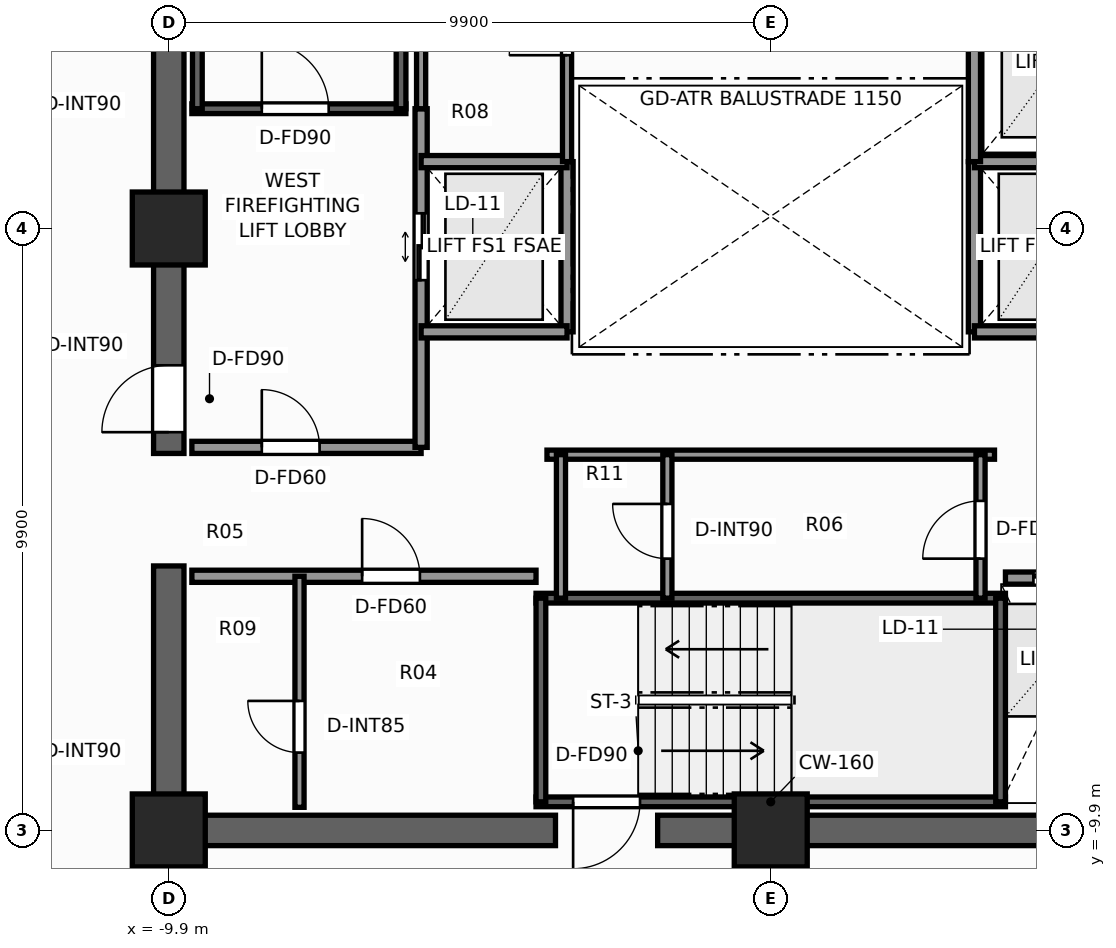
"""IFC4 building model, lengths in metres.
Left out: names, types, materials, properties, quantities, classifications, styles, units other than length and angle.
Written with IfcOpenShell. Run it as: python <this file> out.ifc"""

import sys

from ifc_helpers import new_model, si_unit, direction, frame, frame_2d, origin, origin_2d, place, context, subcontext, project, spatial, rectangle, extrude, element, fill, save


model = new_model("IFC4")
c1 = context("Model", 3, precision=1e-05, world=origin(), true_north=direction((0.0, 1.0)))
c2 = subcontext(c1, "Body", "Model", "MODEL_VIEW")
j1 = project(units=[si_unit("LENGTHUNIT", "METRE"), si_unit("PLANEANGLEUNIT", "RADIAN")], contexts=[c1])
p1 = place(None, origin())
s1 = spatial("IfcSite", under=j1, at=p1, CompositionType="ELEMENT")
p2 = place(p1, origin())
s2 = spatial("IfcBuilding", under=s1, at=p2, CompositionType="ELEMENT")
p3 = place(p2, frame((0.0, 0.0, 186.6)))
s3 = spatial("IfcBuildingStorey", under=s2, at=p3, CompositionType="ELEMENT", Elevation=186.6)
p4 = place(p3, frame((10.15, -9.9, 0.0), z_axis=(0.0, 0.0, 1.0), x_axis=(-1.0, 0.0, 0.0)))
e1 = element("IfcWall", 1, at=p4, inside=s3, PredefinedType="SHEAR", context=c2, shape_type="SweptSolid", body=[
    extrude(rectangle(XDim=12.01, YDim=0.5, at=frame_2d((6.005, 0.0))), origin(), (0.0, 0.0, 1.0), 3.3),
])
p5 = place(p3, frame((-3.54, -9.9, 0.0), z_axis=(0.0, 0.0, 1.0), x_axis=(-1.0, 0.0, 0.0)))
e2 = element("IfcWall", 2, at=p5, inside=s3, PredefinedType="SHEAR", context=c2, shape_type="SweptSolid", body=[
    extrude(rectangle(XDim=6.61, YDim=0.5, at=frame_2d((3.305, 0.0))), origin(), (0.0, 0.0, 1.0), 3.3),
])
p6 = place(p3, frame((-9.9, -9.65, 0.0), z_axis=(0.0, 0.0, 1.0), x_axis=(0.0, 1.0, 0.0)))
e3 = element("IfcWall", 3, at=p6, inside=s3, PredefinedType="SHEAR", context=c2, shape_type="SweptSolid", body=[
    extrude(rectangle(XDim=4.1, YDim=0.5, at=frame_2d((2.05, 0.0))), origin(), (0.0, 0.0, 1.0), 3.3),
])
p7 = place(p3, frame((-9.9, -3.7, 0.0), z_axis=(0.0, 0.0, 1.0), x_axis=(0.0, 1.0, 0.0)))
e4 = element("IfcWall", 4, at=p7, inside=s3, PredefinedType="SHEAR", context=c2, shape_type="SweptSolid", body=[
    extrude(rectangle(XDim=13.35, YDim=0.5, at=frame_2d((6.675, 0.0))), origin(), (0.0, 0.0, 1.0), 3.3),
])
p8 = place(p7, frame((0.35, 0.0, 0.0)))
e5 = element("IfcOpeningElement", 5, at=p8, cuts=e4, PredefinedType="OPENING", context=c2, shape_type="SweptSolid", body=[
    extrude(rectangle(XDim=1.1, YDim=2.2, at=frame_2d((0.55, 1.1))), frame((0.0, 0.26, 0.0), z_axis=(0.0, -1.0, 0.0), x_axis=(1.0, 0.0, 0.0)), (0.0, 0.0, 1.0), 0.52),
])
for number, where, z_axis, x_axis in (
    (6, (-9.9, -9.9, 0.0), (0.0, 0.0, 1.0), (1.0, 0.0, 0.0)),
    (7, (0.0, -9.9, 0.0), (0.0, 0.0, 1.0), (1.0, 0.0, 0.0)),
    (8, (-9.9, 0.0, 0.0), (0.0, 0.0, 1.0), (1.0, 0.0, 0.0)),
):
    element("IfcColumn", number, at=place(p3, frame(where, z_axis=z_axis, x_axis=x_axis)), inside=s3, PredefinedType="COLUMN", context=c2, shape_type="SweptSolid", body=[
        extrude(rectangle(XDim=1.2, YDim=1.2, at=origin_2d()), origin(), (0.0, 0.0, 1.0), 3.3),
    ])
p9 = place(p3, frame((-9.52, 1.97, 0.0), z_axis=(0.0, 0.0, 1.0), x_axis=(1.0, 0.0, 0.0)))
e9 = element("IfcWall", 9, at=p9, inside=s3, PredefinedType="SHEAR", context=c2, shape_type="SweptSolid", body=[
    extrude(rectangle(XDim=3.52, YDim=0.16, at=frame_2d((1.76, 0.0))), origin(), (0.0, 0.0, 1.0), 3.3),
])
p10 = place(p9, frame((1.15, 0.0, 0.0)))
e10 = element("IfcOpeningElement", 10, at=p10, cuts=e9, PredefinedType="OPENING", context=c2, shape_type="SweptSolid", body=[
    extrude(rectangle(XDim=1.1, YDim=2.2, at=frame_2d((0.55, 1.1))), frame((0.0, 0.09, 0.0), z_axis=(0.0, -1.0, 0.0), x_axis=(1.0, 0.0, 0.0)), (0.0, 0.0, 1.0), 0.18),
])
for number, where, z_axis, x_axis in (
    (11, (-9.43, 1.97, 0.0), (0.0, 0.0, 1.0), (0.0, 1.0, 0.0)),
    (12, (-6.08, 1.97, 0.0), (0.0, 0.0, 1.0), (0.0, 1.0, 0.0)),
):
    element("IfcWall", number, at=place(p3, frame(where, z_axis=z_axis, x_axis=x_axis)), inside=s3, PredefinedType="SHEAR", context=c2, shape_type="SweptSolid", body=[
        extrude(rectangle(XDim=7.56, YDim=0.16, at=frame_2d((3.78, 0.0))), origin(), (0.0, 0.0, 1.0), 3.3),
    ])
p11 = place(p3, frame((3.86, -9.43, 0.0), z_axis=(0.0, 0.0, 1.0), x_axis=(-1.0, 0.0, 0.0)))
e13 = element("IfcWall", 13, at=p11, inside=s3, PredefinedType="SHEAR", context=c2, shape_type="SweptSolid", body=[
    extrude(rectangle(XDim=7.72, YDim=0.16, at=frame_2d((3.86, 0.0))), origin(), (0.0, 0.0, 1.0), 3.3),
])
p12 = place(p11, frame((6.01, 0.0, 0.0)))
e14 = element("IfcOpeningElement", 14, at=p12, cuts=e13, PredefinedType="OPENING", context=c2, shape_type="SweptSolid", body=[
    extrude(rectangle(XDim=1.1, YDim=2.2, at=frame_2d((0.55, 1.1))), frame((0.0, 0.09, 0.0), z_axis=(0.0, -1.0, 0.0), x_axis=(1.0, 0.0, 0.0)), (0.0, 0.0, 1.0), 0.18),
])
p13 = place(p3, frame((-3.86, -6.08, 0.0), z_axis=(0.0, 0.0, 1.0), x_axis=(1.0, 0.0, 0.0)))
e15 = element("IfcWall", 15, at=p13, inside=s3, PredefinedType="SHEAR", context=c2, shape_type="SweptSolid", body=[
    extrude(rectangle(XDim=7.72, YDim=0.16, at=frame_2d((3.86, 0.0))), origin(), (0.0, 0.0, 1.0), 3.3),
])
for number, where, z_axis, x_axis in (
    (16, (-3.78, -9.43, 0.0), (0.0, 0.0, 1.0), (0.0, 1.0, 0.0)),
    (17, (3.78, -9.43, 0.0), (0.0, 0.0, 1.0), (0.0, 1.0, 0.0)),
):
    element("IfcWall", number, at=place(p3, frame(where, z_axis=z_axis, x_axis=x_axis)), inside=s3, PredefinedType="SHEAR", context=c2, shape_type="SweptSolid", body=[
        extrude(rectangle(XDim=3.35, YDim=0.16, at=frame_2d((1.675, 0.0))), origin(), (0.0, 0.0, 1.0), 3.3),
    ])
p14 = place(p3, frame((-9.52, -3.6, 0.0), z_axis=(0.0, 0.0, 1.0), x_axis=(1.0, 0.0, 0.0)))
e18 = element("IfcWall", 18, at=p14, inside=s3, PredefinedType="SOLIDWALL", context=c2, shape_type="SweptSolid", body=[
    extrude(rectangle(XDim=3.77, YDim=0.2, at=frame_2d((1.885, 0.0))), origin(), (0.0, 0.0, 1.0), 3.08),
])
p15 = place(p14, frame((1.15, 0.0, 0.0)))
e19 = element("IfcOpeningElement", 19, at=p15, cuts=e18, PredefinedType="OPENING", context=c2, shape_type="SweptSolid", body=[
    extrude(rectangle(XDim=0.95, YDim=2.06, at=frame_2d((0.475, 1.03))), frame((0.0, 0.11, 0.0), z_axis=(0.0, -1.0, 0.0), x_axis=(1.0, 0.0, 0.0)), (0.0, 0.0, 1.0), 0.22),
])
p16 = place(p3, frame((-5.75, -3.6, 0.0), z_axis=(0.0, 0.0, 1.0), x_axis=(0.0, 1.0, 0.0)))
e20 = element("IfcWall", 20, at=p16, inside=s3, PredefinedType="SOLIDWALL", context=c2, shape_type="SweptSolid", body=[
    extrude(rectangle(XDim=5.57, YDim=0.2, at=frame_2d((2.785, 0.0))), origin(), (0.0, 0.0, 1.0), 2.715),
])
p17 = place(p16, frame((2.75, 0.0, 0.0)))
e21 = element("IfcOpeningElement", 21, at=p17, cuts=e20, PredefinedType="OPENING", context=c2, shape_type="SweptSolid", body=[
    extrude(rectangle(XDim=1.1, YDim=2.2, at=frame_2d((0.55, 1.1))), frame((0.0, 0.11, 0.0), z_axis=(0.0, -1.0, 0.0), x_axis=(1.0, 0.0, 0.0)), (0.0, 0.0, 1.0), 0.22),
])
p18 = place(p3, frame((-3.35, -1.7, 0.0), z_axis=(0.0, 0.0, 1.0), x_axis=(0.0, 1.0, 0.0)))
e22 = element("IfcWall", 22, at=p18, inside=s3, PredefinedType="SOLIDWALL", context=c2, shape_type="SweptSolid", body=[
    extrude(rectangle(XDim=2.8, YDim=0.2, at=frame_2d((1.4, 0.0))), origin(), (0.0, 0.0, 1.0), 2.715),
])
for number, where, z_axis, x_axis in (
    (23, (-5.75, -1.7, 0.0), (0.0, 0.0, 1.0), (1.0, 0.0, 0.0)),
    (24, (-5.75, 1.1, 0.0), (0.0, 0.0, 1.0), (1.0, 0.0, 0.0)),
):
    element("IfcWall", number, at=place(p3, frame(where, z_axis=z_axis, x_axis=x_axis)), inside=s3, PredefinedType="SOLIDWALL", context=c2, shape_type="SweptSolid", body=[
        extrude(rectangle(XDim=2.4, YDim=0.2, at=frame_2d((1.2, 0.0))), origin(), (0.0, 0.0, 1.0), 3.08),
    ])
p19 = place(p3, frame((3.35, -1.7, 0.0), z_axis=(0.0, 0.0, 1.0), x_axis=(0.0, 1.0, 0.0)))
e25 = element("IfcWall", 25, at=p19, inside=s3, PredefinedType="SOLIDWALL", context=c2, shape_type="SweptSolid", body=[
    extrude(rectangle(XDim=2.8, YDim=0.2, at=frame_2d((1.4, 0.0))), origin(), (0.0, 0.0, 1.0), 2.715),
])
for number, where, z_axis, x_axis in (
    (26, (3.35, -1.7, 0.0), (0.0, 0.0, 1.0), (1.0, 0.0, 0.0)),
    (27, (3.35, 1.1, 0.0), (0.0, 0.0, 1.0), (1.0, 0.0, 0.0)),
):
    element("IfcWall", number, at=place(p3, frame(where, z_axis=z_axis, x_axis=x_axis)), inside=s3, PredefinedType="SOLIDWALL", context=c2, shape_type="SweptSolid", body=[
        extrude(rectangle(XDim=2.4, YDim=0.2, at=frame_2d((1.2, 0.0))), origin(), (0.0, 0.0, 1.0), 3.08),
    ])
p20 = place(p3, frame((3.35, 1.1, 0.0), z_axis=(0.0, 0.0, 1.0), x_axis=(0.0, 1.0, 0.0)))
e28 = element("IfcWall", 28, at=p20, inside=s3, PredefinedType="SOLIDWALL", context=c2, shape_type="SweptSolid", body=[
    extrude(rectangle(XDim=3.2, YDim=0.2, at=frame_2d((1.6, 0.0))), origin(), (0.0, 0.0, 1.0), 2.715),
])
p21 = place(p3, frame((-9.52, -5.72, 0.0), z_axis=(0.0, 0.0, 1.0), x_axis=(1.0, 0.0, 0.0)))
e29 = element("IfcWall", 29, at=p21, inside=s3, PredefinedType="SOLIDWALL", context=c2, shape_type="SweptSolid", body=[
    extrude(rectangle(XDim=5.66, YDim=0.2, at=frame_2d((2.83, 0.0))), origin(), (0.0, 0.0, 1.0), 3.08),
])
p22 = place(p21, frame((2.8, 0.0, 0.0)))
e30 = element("IfcOpeningElement", 30, at=p22, cuts=e29, PredefinedType="OPENING", context=c2, shape_type="SweptSolid", body=[
    extrude(rectangle(XDim=0.95, YDim=2.06, at=frame_2d((0.475, 1.03))), frame((0.0, 0.11, 0.0), z_axis=(0.0, -1.0, 0.0), x_axis=(1.0, 0.0, 0.0)), (0.0, 0.0, 1.0), 0.22),
])
p23 = place(p3, frame((-7.75, -9.52, 0.0), z_axis=(0.0, 0.0, 1.0), x_axis=(0.0, 1.0, 0.0)))
e31 = element("IfcWall", 31, at=p23, inside=s3, PredefinedType="PARTITIONING", context=c2, shape_type="SweptSolid", body=[
    extrude(rectangle(XDim=3.8, YDim=0.15, at=frame_2d((1.9, 0.0))), origin(), (0.0, 0.0, 1.0), 3.08),
])
p24 = place(p23, frame((0.9, 0.0, 0.0)))
e32 = element("IfcOpeningElement", 32, at=p24, cuts=e31, PredefinedType="OPENING", context=c2, shape_type="SweptSolid", body=[
    extrude(rectangle(XDim=0.85, YDim=2.03, at=frame_2d((0.425, 1.015))), frame((0.0, 0.085, 0.0), z_axis=(0.0, -1.0, 0.0), x_axis=(1.0, 0.0, 0.0)), (0.0, 0.0, 1.0), 0.17),
])
p25 = place(p3, frame((3.86, -5.75, 0.0), z_axis=(0.0, 0.0, 1.0), x_axis=(1.0, 0.0, 0.0)))
e33 = element("IfcWall", 33, at=p25, inside=s3, PredefinedType="SOLIDWALL", context=c2, shape_type="SweptSolid", body=[
    extrude(rectangle(XDim=5.66, YDim=0.2, at=frame_2d((2.83, 0.0))), origin(), (0.0, 0.0, 1.0), 3.08),
])
p26 = place(p25, frame((0.46, 0.0, 0.0)))
e34 = element("IfcOpeningElement", 34, at=p26, cuts=e33, PredefinedType="OPENING", context=c2, shape_type="SweptSolid", body=[
    extrude(rectangle(XDim=1.1, YDim=2.2, at=frame_2d((0.55, 1.1))), frame((0.0, 0.11, 0.0), z_axis=(0.0, -1.0, 0.0), x_axis=(1.0, 0.0, 0.0)), (0.0, 0.0, 1.0), 0.22),
])
p27 = place(p25, frame((2.39, 0.0, 0.0)))
e35 = element("IfcOpeningElement", 35, at=p27, cuts=e33, PredefinedType="OPENING", context=c2, shape_type="SweptSolid", body=[
    extrude(rectangle(XDim=1.1, YDim=2.2, at=frame_2d((0.55, 1.1))), frame((0.0, 0.11, 0.0), z_axis=(0.0, -1.0, 0.0), x_axis=(1.0, 0.0, 0.0)), (0.0, 0.0, 1.0), 0.22),
])
p28 = place(p25, frame((4.32, 0.0, 0.0)))
e36 = element("IfcOpeningElement", 36, at=p28, cuts=e33, PredefinedType="OPENING", context=c2, shape_type="SweptSolid", body=[
    extrude(rectangle(XDim=1.1, YDim=2.2, at=frame_2d((0.55, 1.1))), frame((0.0, 0.11, 0.0), z_axis=(0.0, -1.0, 0.0), x_axis=(1.0, 0.0, 0.0)), (0.0, 0.0, 1.0), 0.22),
])
p29 = place(p3, frame((-3.68, -3.72, 0.0), z_axis=(0.0, 0.0, 1.0), x_axis=(1.0, 0.0, 0.0)))
e37 = element("IfcWall", 37, at=p29, inside=s3, PredefinedType="PARTITIONING", context=c2, shape_type="SweptSolid", body=[
    extrude(rectangle(XDim=7.36, YDim=0.15, at=frame_2d((3.68, 0.0))), origin(), (0.0, 0.0, 1.0), 3.08),
])
p30 = place(p3, frame((3.45, -6.08, 0.0), z_axis=(0.0, 0.0, 1.0), x_axis=(0.0, 1.0, 0.0)))
e38 = element("IfcWall", 38, at=p30, inside=s3, PredefinedType="PARTITIONING", context=c2, shape_type="SweptSolid", body=[
    extrude(rectangle(XDim=2.36, YDim=0.15, at=frame_2d((1.18, 0.0))), origin(), (0.0, 0.0, 1.0), 3.08),
])
p31 = place(p30, frame((0.65, 0.0, 0.0)))
e39 = element("IfcOpeningElement", 39, at=p31, cuts=e38, PredefinedType="OPENING", context=c2, shape_type="SweptSolid", body=[
    extrude(rectangle(XDim=0.95, YDim=2.06, at=frame_2d((0.475, 1.03))), frame((0.0, 0.085, 0.0), z_axis=(0.0, -1.0, 0.0), x_axis=(1.0, 0.0, 0.0)), (0.0, 0.0, 1.0), 0.17),
])
p32 = place(p3, frame((-3.45, -6.08, 0.0), z_axis=(0.0, 0.0, 1.0), x_axis=(0.0, 1.0, 0.0)))
e40 = element("IfcWall", 40, at=p32, inside=s3, PredefinedType="PARTITIONING", context=c2, shape_type="SweptSolid", body=[
    extrude(rectangle(XDim=2.36, YDim=0.15, at=frame_2d((1.18, 0.0))), origin(), (0.0, 0.0, 1.0), 3.08),
])
p33 = place(p3, frame((-1.7, -6.08, 0.0), z_axis=(0.0, 0.0, 1.0), x_axis=(0.0, 1.0, 0.0)))
e41 = element("IfcWall", 41, at=p33, inside=s3, PredefinedType="PARTITIONING", context=c2, shape_type="SweptSolid", body=[
    extrude(rectangle(XDim=2.36, YDim=0.15, at=frame_2d((1.18, 0.0))), origin(), (0.0, 0.0, 1.0), 3.08),
])
p34 = place(p33, frame((0.65, 0.0, 0.0)))
e42 = element("IfcOpeningElement", 42, at=p34, cuts=e41, PredefinedType="OPENING", context=c2, shape_type="SweptSolid", body=[
    extrude(rectangle(XDim=0.9, YDim=2.06, at=frame_2d((0.45, 1.03))), frame((0.0, 0.085, 0.0), z_axis=(0.0, -1.0, 0.0), x_axis=(1.0, 0.0, 0.0)), (0.0, 0.0, 1.0), 0.17),
])
p35 = place(p3, frame((-3.35, 1.1, 0.0), z_axis=(0.0, 0.0, 1.0), x_axis=(0.0, 1.0, 0.0)))
e43 = element("IfcWall", 43, at=p35, inside=s3, PredefinedType="PARTITIONING", context=c2, shape_type="SweptSolid", body=[
    extrude(rectangle(XDim=3.2, YDim=0.15, at=frame_2d((1.6, 0.0))), origin(), (0.0, 0.0, 1.0), 2.715),
])
p36 = place(p35, frame((1.75, 0.0, 0.0)))
e44 = element("IfcOpeningElement", 44, at=p36, cuts=e43, PredefinedType="OPENING", context=c2, shape_type="SweptSolid", body=[
    extrude(rectangle(XDim=0.95, YDim=2.06, at=frame_2d((0.475, 1.03))), frame((0.0, 0.085, 0.0), z_axis=(0.0, -1.0, 0.0), x_axis=(1.0, 0.0, 0.0)), (0.0, 0.0, 1.0), 0.17),
])
p37 = place(p3, frame((-5.75, 1.97, 0.0), z_axis=(0.0, 0.0, 1.0), x_axis=(0.0, 1.0, 0.0)))
e45 = element("IfcWall", 45, at=p37, inside=s3, PredefinedType="PARTITIONING", context=c2, shape_type="SweptSolid", body=[
    extrude(rectangle(XDim=2.33, YDim=0.15, at=frame_2d((1.165, 0.0))), origin(), (0.0, 0.0, 1.0), 2.715),
])
p38 = place(p10, origin())
e46 = element("IfcDoor", 46, at=p38, inside=s3, OperationType="SINGLE_SWING_LEFT", PredefinedType="DOOR", context=c2, shape_type="SweptSolid", body=[
    extrude(rectangle(XDim=1.1, YDim=2.2, at=frame_2d((0.55, 1.1))), frame((0.0, 0.025, 0.0), z_axis=(0.0, -1.0, 0.0), x_axis=(1.0, 0.0, 0.0)), (0.0, 0.0, 1.0), 0.05),
])
fill(e10, e46)
p39 = place(p12, origin())
e47 = element("IfcDoor", 47, at=p39, inside=s3, OperationType="SINGLE_SWING_RIGHT", PredefinedType="DOOR", context=c2, shape_type="SweptSolid", body=[
    extrude(rectangle(XDim=1.1, YDim=2.2, at=frame_2d((0.55, 1.1))), frame((0.0, 0.025, 0.0), z_axis=(0.0, -1.0, 0.0), x_axis=(1.0, 0.0, 0.0)), (0.0, 0.0, 1.0), 0.05),
])
fill(e14, e47)
p40 = place(p8, origin())
e48 = element("IfcDoor", 48, at=p40, inside=s3, OperationType="SINGLE_SWING_LEFT", PredefinedType="DOOR", context=c2, shape_type="SweptSolid", body=[
    extrude(rectangle(XDim=1.1, YDim=2.2, at=frame_2d((0.55, 1.1))), frame((0.0, 0.025, 0.0), z_axis=(0.0, -1.0, 0.0), x_axis=(1.0, 0.0, 0.0)), (0.0, 0.0, 1.0), 0.05),
])
fill(e5, e48)
p41 = place(p17, origin())
e49 = element("IfcDoor", 49, at=p41, inside=s3, OperationType="DOUBLE_DOOR_SLIDING", PredefinedType="DOOR", context=c2, shape_type="SweptSolid", body=[
    extrude(rectangle(XDim=1.1, YDim=2.2, at=frame_2d((0.55, 1.1))), frame((0.0, 0.025, 0.0), z_axis=(0.0, -1.0, 0.0), x_axis=(1.0, 0.0, 0.0)), (0.0, 0.0, 1.0), 0.05),
])
fill(e21, e49)
p42 = place(p22, origin())
e50 = element("IfcDoor", 50, at=p42, inside=s3, OperationType="SINGLE_SWING_LEFT", PredefinedType="DOOR", context=c2, shape_type="SweptSolid", body=[
    extrude(rectangle(XDim=0.95, YDim=2.06, at=frame_2d((0.475, 1.03))), frame((0.0, 0.025, 0.0), z_axis=(0.0, -1.0, 0.0), x_axis=(1.0, 0.0, 0.0)), (0.0, 0.0, 1.0), 0.05),
])
fill(e30, e50)
p43 = place(p24, origin())
e51 = element("IfcDoor", 51, at=p43, inside=s3, OperationType="SINGLE_SWING_RIGHT", PredefinedType="DOOR", context=c2, shape_type="SweptSolid", body=[
    extrude(rectangle(XDim=0.85, YDim=2.03, at=frame_2d((0.425, 1.015))), frame((0.0, 0.025, 0.0), z_axis=(0.0, -1.0, 0.0), x_axis=(1.0, 0.0, 0.0)), (0.0, 0.0, 1.0), 0.05),
])
fill(e32, e51)
p44 = place(p15, origin())
e52 = element("IfcDoor", 52, at=p44, inside=s3, OperationType="SINGLE_SWING_LEFT", PredefinedType="DOOR", context=c2, shape_type="SweptSolid", body=[
    extrude(rectangle(XDim=0.95, YDim=2.06, at=frame_2d((0.475, 1.03))), frame((0.0, 0.025, 0.0), z_axis=(0.0, -1.0, 0.0), x_axis=(1.0, 0.0, 0.0)), (0.0, 0.0, 1.0), 0.05),
])
fill(e19, e52)
p45 = place(p26, origin())
e53 = element("IfcDoor", 53, at=p45, inside=s3, OperationType="DOUBLE_DOOR_SLIDING", PredefinedType="DOOR", context=c2, shape_type="SweptSolid", body=[
    extrude(rectangle(XDim=1.1, YDim=2.2, at=frame_2d((0.55, 1.1))), frame((0.0, 0.025, 0.0), z_axis=(0.0, -1.0, 0.0), x_axis=(1.0, 0.0, 0.0)), (0.0, 0.0, 1.0), 0.05),
])
fill(e34, e53)
p46 = place(p31, origin())
e54 = element("IfcDoor", 54, at=p46, inside=s3, OperationType="SINGLE_SWING_LEFT", PredefinedType="DOOR", context=c2, shape_type="SweptSolid", body=[
    extrude(rectangle(XDim=0.95, YDim=2.06, at=frame_2d((0.475, 1.03))), frame((0.0, 0.025, 0.0), z_axis=(0.0, -1.0, 0.0), x_axis=(1.0, 0.0, 0.0)), (0.0, 0.0, 1.0), 0.05),
])
fill(e39, e54)
p47 = place(p34, origin())
e55 = element("IfcDoor", 55, at=p47, inside=s3, OperationType="SINGLE_SWING_RIGHT", PredefinedType="DOOR", context=c2, shape_type="SweptSolid", body=[
    extrude(rectangle(XDim=0.9, YDim=2.06, at=frame_2d((0.45, 1.03))), frame((0.0, 0.025, 0.0), z_axis=(0.0, -1.0, 0.0), x_axis=(1.0, 0.0, 0.0)), (0.0, 0.0, 1.0), 0.05),
])
fill(e42, e55)
p48 = place(p36, origin())
e56 = element("IfcDoor", 56, at=p48, inside=s3, OperationType="SINGLE_SWING_LEFT", PredefinedType="DOOR", context=c2, shape_type="SweptSolid", body=[
    extrude(rectangle(XDim=0.95, YDim=2.06, at=frame_2d((0.475, 1.03))), frame((0.0, 0.025, 0.0), z_axis=(0.0, -1.0, 0.0), x_axis=(1.0, 0.0, 0.0)), (0.0, 0.0, 1.0), 0.05),
])
fill(e44, e56)
save(model, sys.argv[1])
